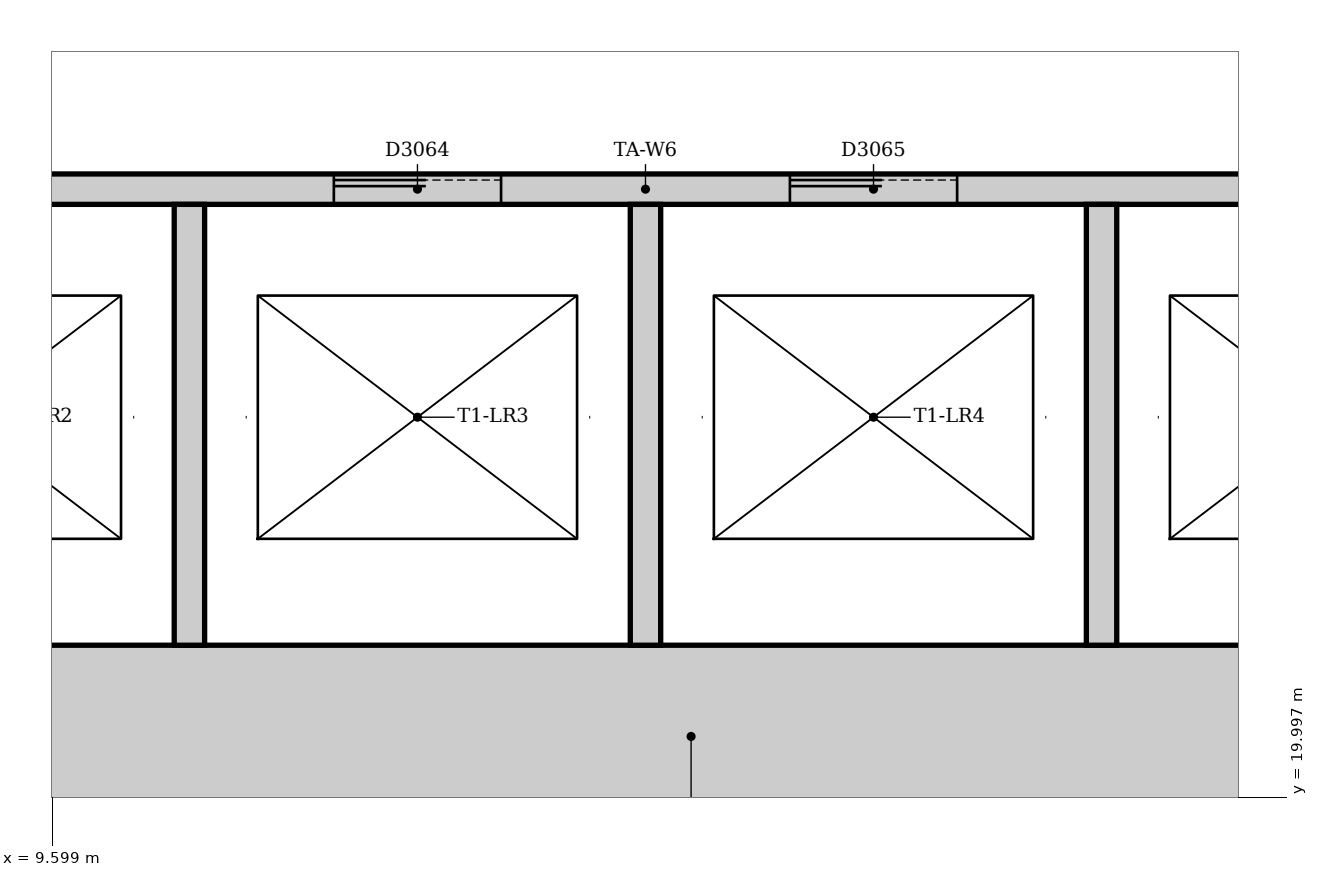
"""IFC4 building model, lengths in metres.
Left out: names, types, materials, properties, quantities, classifications, styles, units other than length and angle.
Written with IfcOpenShell. Run it as: python <this file> out.ifc"""

import sys

from ifc_helpers import new_model, si_unit, direction, frame, frame_2d, origin, place, context, subcontext, project, spatial, rectangle, extrude, element, fill, save


model = new_model("IFC4")
c1 = context("Model", 3, precision=1e-05, world=origin(), true_north=direction((0.0, 1.0)))
c2 = subcontext(c1, "Body", "Model", "MODEL_VIEW")
j1 = project(units=[si_unit("LENGTHUNIT", "METRE"), si_unit("PLANEANGLEUNIT", "RADIAN")], contexts=[c1])
p1 = place(None, origin())
s1 = spatial("IfcSite", under=j1, at=p1, CompositionType="ELEMENT")
p2 = place(p1, origin())
s2 = spatial("IfcBuilding", under=s1, at=p2, CompositionType="ELEMENT")
p3 = place(p2, origin())
s3 = spatial("IfcBuildingStorey", under=s2, at=p3, CompositionType="ELEMENT", Elevation=0.0)
p4 = place(p3, frame((3.9, 20.4, 0.0), z_axis=(0.0, 0.0, 1.0), x_axis=(1.0, 0.0, 0.0)))
e1 = element("IfcWall", 1, at=p4, inside=s3, PredefinedType="SOLIDWALL", context=c2, shape_type="SweptSolid", body=[
    extrude(rectangle(XDim=19.8, YDim=1.2, at=frame_2d((9.9, 0.0))), origin(), (0.0, 0.0, 1.0), 6.0),
])
p5 = place(p3, frame((4.5, 24.0, 0.0), z_axis=(0.0, 0.0, 1.0), x_axis=(1.0, 0.0, 0.0)))
e2 = element("IfcWall", 2, at=p5, inside=s3, PredefinedType="PARTITIONING", context=c2, shape_type="SweptSolid", body=[
    extrude(rectangle(XDim=18.0, YDim=0.2, at=frame_2d((9.0, 0.0))), origin(), (0.0, 0.0, 1.0), 5.7),
])
p6 = place(p5, frame((0.95, 0.0, 0.0)))
e3 = element("IfcOpeningElement", 3, at=p6, cuts=e2, PredefinedType="OPENING", context=c2, shape_type="SweptSolid", body=[
    extrude(rectangle(XDim=1.1, YDim=2.1, at=frame_2d((0.55, 1.05))), frame((0.0, 0.11, 0.0), z_axis=(0.0, -1.0, 0.0), x_axis=(1.0, 0.0, 0.0)), (0.0, 0.0, 1.0), 0.22),
])
p7 = place(p5, frame((3.95, 0.0, 0.0)))
e4 = element("IfcOpeningElement", 4, at=p7, cuts=e2, PredefinedType="OPENING", context=c2, shape_type="SweptSolid", body=[
    extrude(rectangle(XDim=1.1, YDim=2.1, at=frame_2d((0.55, 1.05))), frame((0.0, 0.11, 0.0), z_axis=(0.0, -1.0, 0.0), x_axis=(1.0, 0.0, 0.0)), (0.0, 0.0, 1.0), 0.22),
])
p8 = place(p5, frame((6.95, 0.0, 0.0)))
e5 = element("IfcOpeningElement", 5, at=p8, cuts=e2, PredefinedType="OPENING", context=c2, shape_type="SweptSolid", body=[
    extrude(rectangle(XDim=1.1, YDim=2.1, at=frame_2d((0.55, 1.05))), frame((0.0, 0.11, 0.0), z_axis=(0.0, -1.0, 0.0), x_axis=(1.0, 0.0, 0.0)), (0.0, 0.0, 1.0), 0.22),
])
p9 = place(p5, frame((9.95, 0.0, 0.0)))
e6 = element("IfcOpeningElement", 6, at=p9, cuts=e2, PredefinedType="OPENING", context=c2, shape_type="SweptSolid", body=[
    extrude(rectangle(XDim=1.1, YDim=2.1, at=frame_2d((0.55, 1.05))), frame((0.0, 0.11, 0.0), z_axis=(0.0, -1.0, 0.0), x_axis=(1.0, 0.0, 0.0)), (0.0, 0.0, 1.0), 0.22),
])
p10 = place(p5, frame((12.95, 0.0, 0.0)))
e7 = element("IfcOpeningElement", 7, at=p10, cuts=e2, PredefinedType="OPENING", context=c2, shape_type="SweptSolid", body=[
    extrude(rectangle(XDim=1.1, YDim=2.1, at=frame_2d((0.55, 1.05))), frame((0.0, 0.11, 0.0), z_axis=(0.0, -1.0, 0.0), x_axis=(1.0, 0.0, 0.0)), (0.0, 0.0, 1.0), 0.22),
])
p11 = place(p5, frame((15.95, 0.0, 0.0)))
e8 = element("IfcOpeningElement", 8, at=p11, cuts=e2, PredefinedType="OPENING", context=c2, shape_type="SweptSolid", body=[
    extrude(rectangle(XDim=1.1, YDim=2.1, at=frame_2d((0.55, 1.05))), frame((0.0, 0.11, 0.0), z_axis=(0.0, -1.0, 0.0), x_axis=(1.0, 0.0, 0.0)), (0.0, 0.0, 1.0), 0.22),
])
for number, where, z_axis, x_axis in (
    (9, (10.5, 21.0, 0.0), (0.0, 0.0, 1.0), (0.0, 1.0, 0.0)),
    (10, (13.5, 21.0, 0.0), (0.0, 0.0, 1.0), (0.0, 1.0, 0.0)),
    (11, (16.5, 21.0, 0.0), (0.0, 0.0, 1.0), (0.0, 1.0, 0.0)),
):
    element("IfcWall", number, at=place(p3, frame(where, z_axis=z_axis, x_axis=x_axis)), inside=s3, PredefinedType="PARTITIONING", context=c2, shape_type="SweptSolid", body=[
        extrude(rectangle(XDim=2.9, YDim=0.2, at=frame_2d((1.45, 0.0))), origin(), (0.0, 0.0, 1.0), 5.7),
    ])
p12 = place(p8, origin())
e12 = element("IfcDoor", 12, at=p12, inside=s3, OperationType="SLIDING_TO_LEFT", PredefinedType="DOOR", context=c2, shape_type="SweptSolid", body=[
    extrude(rectangle(XDim=1.1, YDim=2.1, at=frame_2d((0.55, 1.05))), frame((0.0, 0.025, 0.0), z_axis=(0.0, -1.0, 0.0), x_axis=(1.0, 0.0, 0.0)), (0.0, 0.0, 1.0), 0.05),
])
fill(e5, e12)
p13 = place(p9, origin())
e13 = element("IfcDoor", 13, at=p13, inside=s3, OperationType="SLIDING_TO_LEFT", PredefinedType="DOOR", context=c2, shape_type="SweptSolid", body=[
    extrude(rectangle(XDim=1.1, YDim=2.1, at=frame_2d((0.55, 1.05))), frame((0.0, 0.025, 0.0), z_axis=(0.0, -1.0, 0.0), x_axis=(1.0, 0.0, 0.0)), (0.0, 0.0, 1.0), 0.05),
])
fill(e6, e13)
save(model, sys.argv[1])
